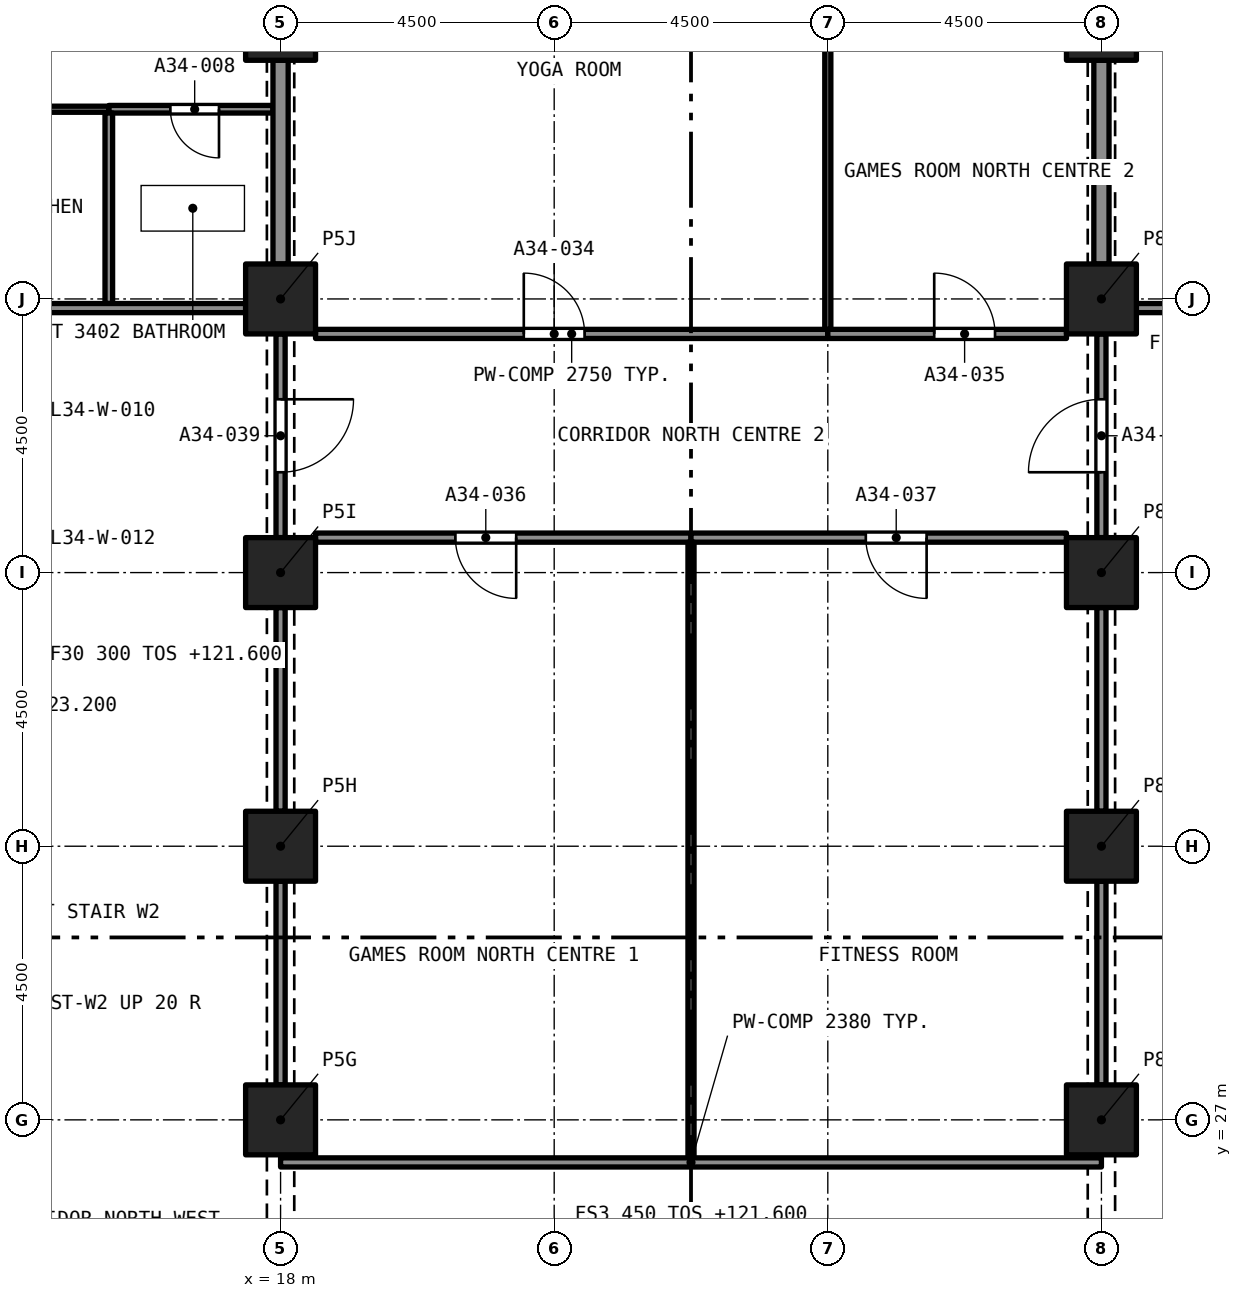
"""IFC4 building model, lengths in metres.
Left out: names, types, materials, properties, quantities, classifications, styles, units other than length and angle.
Written with IfcOpenShell. Run it as: python <this file> out.ifc"""

import sys

from ifc_helpers import new_model, si_unit, direction, frame, frame_2d, origin, origin_2d, place, context, subcontext, project, spatial, rectangle, extrude, element, fill, save


model = new_model("IFC4")
c1 = context("Model", 3, precision=1e-05, world=origin(), true_north=direction((0.0, 1.0)))
c2 = subcontext(c1, "Body", "Model", "MODEL_VIEW")
j1 = project(units=[si_unit("LENGTHUNIT", "METRE"), si_unit("PLANEANGLEUNIT", "RADIAN")], contexts=[c1])
p1 = place(None, origin())
s1 = spatial("IfcSite", under=j1, at=p1, CompositionType="ELEMENT")
p2 = place(p1, origin())
s2 = spatial("IfcBuilding", under=s1, at=p2, CompositionType="ELEMENT")
p3 = place(p2, frame((0.0, 0.0, 121.6)))
s3 = spatial("IfcBuildingStorey", under=s2, at=p3, CompositionType="ELEMENT", Elevation=121.6)
for number, where, z_axis, x_axis in (
    (1, (18.0, 27.0, 0.0), (0.0, 0.0, 1.0), (1.0, 0.0, 0.0)),
    (2, (31.5, 27.0, 0.0), (0.0, 0.0, 1.0), (1.0, 0.0, 0.0)),
    (3, (18.0, 31.5, 0.0), (0.0, 0.0, 1.0), (1.0, 0.0, 0.0)),
    (4, (31.5, 31.5, 0.0), (0.0, 0.0, 1.0), (1.0, 0.0, 0.0)),
    (5, (18.0, 36.0, 0.0), (0.0, 0.0, 1.0), (1.0, 0.0, 0.0)),
    (6, (31.5, 36.0, 0.0), (0.0, 0.0, 1.0), (1.0, 0.0, 0.0)),
    (7, (18.0, 40.5, 0.0), (0.0, 0.0, 1.0), (1.0, 0.0, 0.0)),
    (8, (31.5, 40.5, 0.0), (0.0, 0.0, 1.0), (1.0, 0.0, 0.0)),
    (9, (18.0, 45.0, 0.0), (0.0, 0.0, 1.0), (1.0, 0.0, 0.0)),
    (10, (31.5, 45.0, 0.0), (0.0, 0.0, 1.0), (1.0, 0.0, 0.0)),
):
    element("IfcColumn", number, at=place(p3, frame(where, z_axis=z_axis, x_axis=x_axis)), inside=s3, PredefinedType="COLUMN", context=c2, shape_type="SweptSolid", body=[
        extrude(rectangle(XDim=1.15, YDim=1.15, at=origin_2d()), origin(), (0.0, 0.0, 1.0), 3.2),
    ])
p4 = place(p3, frame((17.875, 43.62, 0.0), z_axis=(0.0, 0.0, 1.0), x_axis=(-1.0, 0.0, 0.0)))
e11 = element("IfcWall", 11, at=p4, inside=s3, PredefinedType="PARTITIONING", context=c2, shape_type="SweptSolid", body=[
    extrude(rectangle(XDim=2.7, YDim=0.125, at=frame_2d((1.35, 0.0))), origin(), (0.0, 0.0, 1.0), 2.85),
])
p5 = place(p4, frame((0.888, 0.0, 0.0)))
e12 = element("IfcOpeningElement", 12, at=p5, cuts=e11, PredefinedType="OPENING", context=c2, shape_type="SweptSolid", body=[
    extrude(rectangle(XDim=0.8, YDim=2.1, at=frame_2d((0.4, 1.05))), frame((0.0, 0.073, 0.0), z_axis=(0.0, -1.0, 0.0), x_axis=(1.0, 0.0, 0.0)), (0.0, 0.0, 1.0), 0.145),
])
p6 = place(p3, frame((15.175, 40.425, 0.0), z_axis=(0.0, 0.0, 1.0), x_axis=(0.0, 1.0, 0.0)))
e13 = element("IfcWall", 13, at=p6, inside=s3, PredefinedType="PARTITIONING", context=c2, shape_type="SweptSolid", body=[
    extrude(rectangle(XDim=3.133, YDim=0.125, at=frame_2d((1.566, 0.0))), origin(), (0.0, 0.0, 1.0), 2.85),
])
p7 = place(p3, frame((18.0, 41.075, 0.0), z_axis=(0.0, 0.0, 1.0), x_axis=(0.0, 1.0, 0.0)))
e14 = element("IfcWall", 14, at=p7, inside=s3, PredefinedType="PARTITIONING", context=c2, shape_type="SweptSolid", body=[
    extrude(rectangle(XDim=3.35, YDim=0.25, at=frame_2d((1.675, 0.0))), origin(), (0.0, 0.0, 1.0), 2.38),
])
p8 = place(p3, frame((15.175, 43.62, 0.0), z_axis=(0.0, 0.0, 1.0), x_axis=(-1.0, 0.0, 0.0)))
e15 = element("IfcWall", 15, at=p8, inside=s3, PredefinedType="PARTITIONING", context=c2, shape_type="SweptSolid", body=[
    extrude(rectangle(XDim=4.125, YDim=0.1, at=frame_2d((2.062, 0.0))), origin(), (0.0, 0.0, 1.0), 2.85),
])
p9 = place(p8, frame((1.587, 0.0, 0.0)))
e16 = element("IfcOpeningElement", 16, at=p9, cuts=e15, PredefinedType="OPENING", context=c2, shape_type="SweptSolid", body=[
    extrude(rectangle(XDim=0.9, YDim=2.1, at=frame_2d((0.45, 1.05))), frame((0.0, 0.06, 0.0), z_axis=(0.0, -1.0, 0.0), x_axis=(1.0, 0.0, 0.0)), (0.0, 0.0, 1.0), 0.12),
])
p10 = place(p3, frame((13.35, 40.35, 0.0), z_axis=(0.0, 0.0, 1.0), x_axis=(1.0, 0.0, 0.0)))
e17 = element("IfcWall", 17, at=p10, inside=s3, PredefinedType="PARTITIONING", context=c2, shape_type="SweptSolid", body=[
    extrude(rectangle(XDim=4.075, YDim=0.15, at=frame_2d((2.038, 0.0))), origin(), (0.0, 0.0, 1.0), 2.85),
])
p11 = place(p3, frame((31.5, 41.075, 0.0), z_axis=(0.0, 0.0, 1.0), x_axis=(0.0, 1.0, 0.0)))
e18 = element("IfcWall", 18, at=p11, inside=s3, PredefinedType="PARTITIONING", context=c2, shape_type="SweptSolid", body=[
    extrude(rectangle(XDim=3.35, YDim=0.25, at=frame_2d((1.675, 0.0))), origin(), (0.0, 0.0, 1.0), 2.38),
])
p12 = place(p3, frame((32.075, 40.35, 0.0), z_axis=(0.0, 0.0, 1.0), x_axis=(1.0, 0.0, 0.0)))
e19 = element("IfcWall", 19, at=p12, inside=s3, PredefinedType="PARTITIONING", context=c2, shape_type="SweptSolid", body=[
    extrude(rectangle(XDim=2.35, YDim=0.15, at=frame_2d((1.175, 0.0))), origin(), (0.0, 0.0, 1.0), 2.85),
])
p13 = place(p12, frame((1.175, 0.0, 0.0)))
e20 = element("IfcOpeningElement", 20, at=p13, cuts=e19, PredefinedType="OPENING", context=c2, shape_type="SweptSolid", body=[
    extrude(rectangle(XDim=1.0, YDim=2.1, at=frame_2d((0.5, 1.05))), frame((0.0, 0.085, 0.0), z_axis=(0.0, -1.0, 0.0), x_axis=(1.0, 0.0, 0.0)), (0.0, 0.0, 1.0), 0.17),
])
p14 = place(p3, frame((18.575, 39.925, 0.0), z_axis=(0.0, 0.0, 1.0), x_axis=(1.0, 0.0, 0.0)))
e21 = element("IfcWall", 21, at=p14, inside=s3, PredefinedType="PARTITIONING", context=c2, shape_type="SweptSolid", body=[
    extrude(rectangle(XDim=8.425, YDim=0.15, at=frame_2d((4.212, 0.0))), origin(), (0.0, 0.0, 1.0), 2.75),
])
p15 = place(p14, frame((3.425, 0.0, 0.0)))
e22 = element("IfcOpeningElement", 22, at=p15, cuts=e21, PredefinedType="OPENING", context=c2, shape_type="SweptSolid", body=[
    extrude(rectangle(XDim=1.0, YDim=2.1, at=frame_2d((0.5, 1.05))), frame((0.0, 0.085, 0.0), z_axis=(0.0, -1.0, 0.0), x_axis=(1.0, 0.0, 0.0)), (0.0, 0.0, 1.0), 0.17),
])
p16 = place(p3, frame((27.0, 39.925, 0.0), z_axis=(0.0, 0.0, 1.0), x_axis=(1.0, 0.0, 0.0)))
e23 = element("IfcWall", 23, at=p16, inside=s3, PredefinedType="PARTITIONING", context=c2, shape_type="SweptSolid", body=[
    extrude(rectangle(XDim=3.925, YDim=0.15, at=frame_2d((1.962, 0.0))), origin(), (0.0, 0.0, 1.0), 2.75),
])
p17 = place(p16, frame((1.75, 0.0, 0.0)))
e24 = element("IfcOpeningElement", 24, at=p17, cuts=e23, PredefinedType="OPENING", context=c2, shape_type="SweptSolid", body=[
    extrude(rectangle(XDim=1.0, YDim=2.1, at=frame_2d((0.5, 1.05))), frame((0.0, 0.085, 0.0), z_axis=(0.0, -1.0, 0.0), x_axis=(1.0, 0.0, 0.0)), (0.0, 0.0, 1.0), 0.17),
])
p18 = place(p3, frame((24.75, 36.575, 0.0), z_axis=(0.0, 0.0, 1.0), x_axis=(-1.0, 0.0, 0.0)))
e25 = element("IfcWall", 25, at=p18, inside=s3, PredefinedType="PARTITIONING", context=c2, shape_type="SweptSolid", body=[
    extrude(rectangle(XDim=6.175, YDim=0.15, at=frame_2d((3.087, 0.0))), origin(), (0.0, 0.0, 1.0), 2.75),
])
p19 = place(p18, frame((2.875, 0.0, 0.0)))
e26 = element("IfcOpeningElement", 26, at=p19, cuts=e25, PredefinedType="OPENING", context=c2, shape_type="SweptSolid", body=[
    extrude(rectangle(XDim=1.0, YDim=2.1, at=frame_2d((0.5, 1.05))), frame((0.0, 0.085, 0.0), z_axis=(0.0, -1.0, 0.0), x_axis=(1.0, 0.0, 0.0)), (0.0, 0.0, 1.0), 0.17),
])
p20 = place(p3, frame((30.925, 36.575, 0.0), z_axis=(0.0, 0.0, 1.0), x_axis=(-1.0, 0.0, 0.0)))
e27 = element("IfcWall", 27, at=p20, inside=s3, PredefinedType="PARTITIONING", context=c2, shape_type="SweptSolid", body=[
    extrude(rectangle(XDim=6.175, YDim=0.15, at=frame_2d((3.087, 0.0))), origin(), (0.0, 0.0, 1.0), 2.75),
])
p21 = place(p20, frame((2.3, 0.0, 0.0)))
e28 = element("IfcOpeningElement", 28, at=p21, cuts=e27, PredefinedType="OPENING", context=c2, shape_type="SweptSolid", body=[
    extrude(rectangle(XDim=1.0, YDim=2.1, at=frame_2d((0.5, 1.05))), frame((0.0, 0.085, 0.0), z_axis=(0.0, -1.0, 0.0), x_axis=(1.0, 0.0, 0.0)), (0.0, 0.0, 1.0), 0.17),
])
p22 = place(p3, frame((31.5, 36.575, 0.0), z_axis=(0.0, 0.0, 1.0), x_axis=(0.0, 1.0, 0.0)))
e29 = element("IfcWall", 29, at=p22, inside=s3, PredefinedType="PARTITIONING", context=c2, shape_type="SweptSolid", body=[
    extrude(rectangle(XDim=3.35, YDim=0.15, at=frame_2d((1.675, 0.0))), origin(), (0.0, 0.0, 1.0), 2.38),
])
p23 = place(p22, frame((1.075, 0.0, 0.0)))
e30 = element("IfcOpeningElement", 30, at=p23, cuts=e29, PredefinedType="OPENING", context=c2, shape_type="SweptSolid", body=[
    extrude(rectangle(XDim=1.2, YDim=2.1, at=frame_2d((0.6, 1.05))), frame((0.0, 0.085, 0.0), z_axis=(0.0, -1.0, 0.0), x_axis=(1.0, 0.0, 0.0)), (0.0, 0.0, 1.0), 0.17),
])
p24 = place(p3, frame((18.0, 39.925, 0.0), z_axis=(0.0, 0.0, 1.0), x_axis=(0.0, -1.0, 0.0)))
e31 = element("IfcWall", 31, at=p24, inside=s3, PredefinedType="PARTITIONING", context=c2, shape_type="SweptSolid", body=[
    extrude(rectangle(XDim=3.35, YDim=0.15, at=frame_2d((1.675, 0.0))), origin(), (0.0, 0.0, 1.0), 2.38),
])
p25 = place(p24, frame((1.075, 0.0, 0.0)))
e32 = element("IfcOpeningElement", 32, at=p25, cuts=e31, PredefinedType="OPENING", context=c2, shape_type="SweptSolid", body=[
    extrude(rectangle(XDim=1.2, YDim=2.1, at=frame_2d((0.6, 1.05))), frame((0.0, 0.085, 0.0), z_axis=(0.0, -1.0, 0.0), x_axis=(1.0, 0.0, 0.0)), (0.0, 0.0, 1.0), 0.17),
])
p26 = place(p3, frame((27.0, 40.0, 0.0), z_axis=(0.0, 0.0, 1.0), x_axis=(0.0, 1.0, 0.0)))
e33 = element("IfcWall", 33, at=p26, inside=s3, PredefinedType="PARTITIONING", context=c2, shape_type="SweptSolid", body=[
    extrude(rectangle(XDim=8.925, YDim=0.1, at=frame_2d((4.462, 0.0))), origin(), (0.0, 0.0, 1.0), 2.75),
])
p27 = place(p3, frame((24.75, 26.375, 0.0), z_axis=(0.0, 0.0, 1.0), x_axis=(0.0, 1.0, 0.0)))
e34 = element("IfcWall", 34, at=p27, inside=s3, PredefinedType="PARTITIONING", context=c2, shape_type="SweptSolid", body=[
    extrude(rectangle(XDim=10.125, YDim=0.1, at=frame_2d((5.062, 0.0))), origin(), (0.0, 0.0, 1.0), 2.75),
])
for number, where, z_axis, x_axis in (
    (35, (18.0, 27.575, 0.0), (0.0, 0.0, 1.0), (0.0, 1.0, 0.0)),
    (36, (18.0, 32.075, 0.0), (0.0, 0.0, 1.0), (0.0, 1.0, 0.0)),
):
    element("IfcWall", number, at=place(p3, frame(where, z_axis=z_axis, x_axis=x_axis)), inside=s3, PredefinedType="PARTITIONING", context=c2, shape_type="SweptSolid", body=[
        extrude(rectangle(XDim=3.35, YDim=0.15, at=frame_2d((1.675, 0.0))), origin(), (0.0, 0.0, 1.0), 2.38),
    ])
p28 = place(p3, frame((18.0, 26.3, 0.0), z_axis=(0.0, 0.0, 1.0), x_axis=(1.0, 0.0, 0.0)))
e37 = element("IfcWall", 37, at=p28, inside=s3, PredefinedType="PARTITIONING", context=c2, shape_type="SweptSolid", body=[
    extrude(rectangle(XDim=13.5, YDim=0.15, at=frame_2d((6.75, 0.0))), origin(), (0.0, 0.0, 1.0), 2.38),
])
for number, where, z_axis, x_axis in (
    (38, (31.5, 32.075, 0.0), (0.0, 0.0, 1.0), (0.0, 1.0, 0.0)),
    (39, (31.5, 27.575, 0.0), (0.0, 0.0, 1.0), (0.0, 1.0, 0.0)),
):
    element("IfcWall", number, at=place(p3, frame(where, z_axis=z_axis, x_axis=x_axis)), inside=s3, PredefinedType="PARTITIONING", context=c2, shape_type="SweptSolid", body=[
        extrude(rectangle(XDim=3.35, YDim=0.15, at=frame_2d((1.675, 0.0))), origin(), (0.0, 0.0, 1.0), 2.38),
    ])
p29 = place(p5, origin())
e40 = element("IfcDoor", 40, at=p29, inside=s3, OperationType="SINGLE_SWING_LEFT", PredefinedType="DOOR", context=c2, shape_type="SweptSolid", body=[
    extrude(rectangle(XDim=0.8, YDim=2.1, at=frame_2d((0.4, 1.05))), frame((0.0, 0.025, 0.0), z_axis=(0.0, -1.0, 0.0), x_axis=(1.0, 0.0, 0.0)), (0.0, 0.0, 1.0), 0.05),
])
fill(e12, e40)
p30 = place(p15, origin())
e41 = element("IfcDoor", 41, at=p30, inside=s3, OperationType="SINGLE_SWING_LEFT", PredefinedType="DOOR", context=c2, shape_type="SweptSolid", body=[
    extrude(rectangle(XDim=1.0, YDim=2.1, at=frame_2d((0.5, 1.05))), frame((0.0, 0.025, 0.0), z_axis=(0.0, -1.0, 0.0), x_axis=(1.0, 0.0, 0.0)), (0.0, 0.0, 1.0), 0.05),
])
fill(e22, e41)
p31 = place(p17, origin())
e42 = element("IfcDoor", 42, at=p31, inside=s3, OperationType="SINGLE_SWING_RIGHT", PredefinedType="DOOR", context=c2, shape_type="SweptSolid", body=[
    extrude(rectangle(XDim=1.0, YDim=2.1, at=frame_2d((0.5, 1.05))), frame((0.0, 0.025, 0.0), z_axis=(0.0, -1.0, 0.0), x_axis=(1.0, 0.0, 0.0)), (0.0, 0.0, 1.0), 0.05),
])
fill(e24, e42)
p32 = place(p19, origin())
e43 = element("IfcDoor", 43, at=p32, inside=s3, OperationType="SINGLE_SWING_RIGHT", PredefinedType="DOOR", context=c2, shape_type="SweptSolid", body=[
    extrude(rectangle(XDim=1.0, YDim=2.1, at=frame_2d((0.5, 1.05))), frame((0.0, 0.025, 0.0), z_axis=(0.0, -1.0, 0.0), x_axis=(1.0, 0.0, 0.0)), (0.0, 0.0, 1.0), 0.05),
])
fill(e26, e43)
p33 = place(p21, origin())
e44 = element("IfcDoor", 44, at=p33, inside=s3, OperationType="SINGLE_SWING_LEFT", PredefinedType="DOOR", context=c2, shape_type="SweptSolid", body=[
    extrude(rectangle(XDim=1.0, YDim=2.1, at=frame_2d((0.5, 1.05))), frame((0.0, 0.025, 0.0), z_axis=(0.0, -1.0, 0.0), x_axis=(1.0, 0.0, 0.0)), (0.0, 0.0, 1.0), 0.05),
])
fill(e28, e44)
p34 = place(p23, origin())
e45 = element("IfcDoor", 45, at=p34, inside=s3, OperationType="SINGLE_SWING_LEFT", PredefinedType="DOOR", context=c2, shape_type="SweptSolid", body=[
    extrude(rectangle(XDim=1.2, YDim=2.1, at=frame_2d((0.6, 1.05))), frame((0.0, 0.025, 0.0), z_axis=(0.0, -1.0, 0.0), x_axis=(1.0, 0.0, 0.0)), (0.0, 0.0, 1.0), 0.05),
])
fill(e30, e45)
p35 = place(p25, origin())
e46 = element("IfcDoor", 46, at=p35, inside=s3, OperationType="SINGLE_SWING_LEFT", PredefinedType="DOOR", context=c2, shape_type="SweptSolid", body=[
    extrude(rectangle(XDim=1.2, YDim=2.1, at=frame_2d((0.6, 1.05))), frame((0.0, 0.025, 0.0), z_axis=(0.0, -1.0, 0.0), x_axis=(1.0, 0.0, 0.0)), (0.0, 0.0, 1.0), 0.05),
])
fill(e32, e46)
save(model, sys.argv[1])
